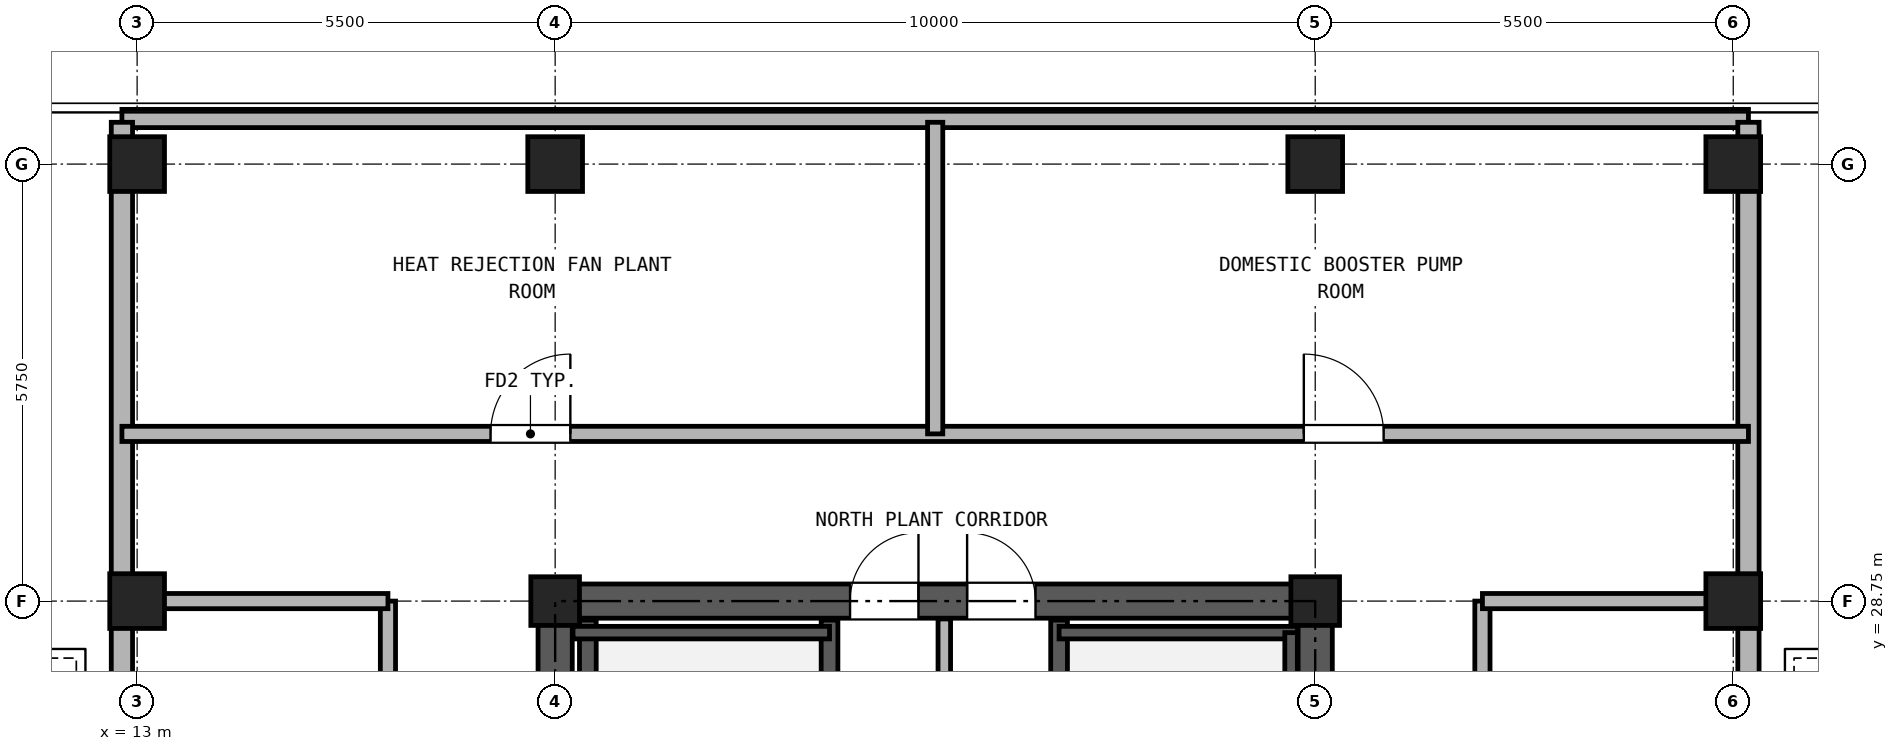
"""IFC4 building model, lengths in metres.
Left out: names, types, materials, properties, quantities, classifications, styles, units other than length and angle.
Written with IfcOpenShell. Run it as: python <this file> out.ifc"""

import sys

from ifc_helpers import new_model, si_unit, direction, frame, frame_2d, origin, origin_2d, place, context, subcontext, project, spatial, rectangle, hollow_rectangle, extrude, source, transform, mapped, element, fill, save


model = new_model("IFC4")
c1 = context("Model", 3, precision=1e-05, world=origin(), true_north=direction((0.0, 1.0)))
c2 = subcontext(c1, "Body", "Model", "MODEL_VIEW")
j1 = project(units=[si_unit("LENGTHUNIT", "METRE"), si_unit("PLANEANGLEUNIT", "RADIAN")], contexts=[c1])
p1 = place(None, origin())
s1 = spatial("IfcSite", under=j1, at=p1, CompositionType="ELEMENT")
p2 = place(p1, origin())
s2 = spatial("IfcBuilding", under=s1, at=p2, CompositionType="ELEMENT")
p3 = place(p2, frame((0.0, 0.0, 188.1)))
s3 = spatial("IfcBuildingStorey", under=s2, at=p3, CompositionType="ELEMENT", Elevation=188.1)
m1 = source(origin(), c2, "Body", "SweptSolid", [
    extrude(hollow_rectangle(XDim=0.72, YDim=0.72, WallThickness=0.04, at=origin_2d()), origin(), (0.0, 0.0, 1.0), 4.85),
])
for number, where, z_axis, x_axis in (
    (1, (13.0, 34.5, 0.0), (0.0, 0.0, 1.0), (1.0, 0.0, 0.0)),
    (2, (18.5, 34.5, 0.0), (0.0, 0.0, 1.0), (1.0, 0.0, 0.0)),
    (3, (28.5, 34.5, 0.0), (0.0, 0.0, 1.0), (1.0, 0.0, 0.0)),
    (4, (34.0, 34.5, 0.0), (0.0, 0.0, 1.0), (1.0, 0.0, 0.0)),
    (5, (13.0, 28.75, 0.0), (0.0, 0.0, 1.0), (1.0, 0.0, 0.0)),
):
    element("IfcColumn", number, at=place(p3, frame(where, z_axis=z_axis, x_axis=x_axis)), inside=s3, PredefinedType="COLUMN", context=c2, shape_type="MappedRepresentation", body=[
        mapped(m1, transform((0.0, 0.0, 0.0), x_axis=(1.0, 0.0, 0.0), y_axis=(0.0, 1.0, 0.0), z_axis=(0.0, 0.0, 1.0), scale=1.0)),
    ])
m2 = source(origin(), c2, "Body", "SweptSolid", [
    extrude(hollow_rectangle(XDim=0.64, YDim=0.64, WallThickness=0.035, at=origin_2d()), origin(), (0.0, 0.0, 1.0), 4.85),
])
for number, where, z_axis, x_axis in (
    (6, (18.5, 28.75, 0.0), (0.0, 0.0, 1.0), (1.0, 0.0, 0.0)),
    (7, (28.5, 28.75, 0.0), (0.0, 0.0, 1.0), (1.0, 0.0, 0.0)),
):
    element("IfcColumn", number, at=place(p3, frame(where, z_axis=z_axis, x_axis=x_axis)), inside=s3, PredefinedType="COLUMN", context=c2, shape_type="MappedRepresentation", body=[
        mapped(m2, transform((0.0, 0.0, 0.0), x_axis=(1.0, 0.0, 0.0), y_axis=(0.0, 1.0, 0.0), z_axis=(0.0, 0.0, 1.0), scale=1.0)),
    ])
p4 = place(p3, frame((34.0, 28.75, 0.0), z_axis=(0.0, 0.0, 1.0), x_axis=(1.0, 0.0, 0.0)))
e8 = element("IfcColumn", 8, at=p4, inside=s3, PredefinedType="COLUMN", context=c2, shape_type="MappedRepresentation", body=[
    mapped(m1, transform((0.0, 0.0, 0.0), x_axis=(1.0, 0.0, 0.0), y_axis=(0.0, 1.0, 0.0), z_axis=(0.0, 0.0, 1.0), scale=1.0)),
])
p5 = place(p3, frame((34.2, 35.1, 0.0), z_axis=(0.0, 0.0, 1.0), x_axis=(-1.0, 0.0, 0.0)))
e9 = element("IfcWall", 9, at=p5, inside=s3, PredefinedType="SOLIDWALL", context=c2, shape_type="SweptSolid", body=[
    extrude(rectangle(XDim=21.4, YDim=0.24, at=frame_2d((10.7, 0.0))), origin(), (0.0, 0.0, 1.0), 4.85),
])
p6 = place(p3, frame((18.275, 28.75, 0.0), z_axis=(0.0, 0.0, 1.0), x_axis=(1.0, 0.0, 0.0)))
e10 = element("IfcWall", 10, at=p6, inside=s3, PredefinedType="SHEAR", context=c2, shape_type="SweptSolid", body=[
    extrude(rectangle(XDim=10.45, YDim=0.45, at=frame_2d((5.225, 0.0))), origin(), (0.0, 0.0, 1.0), 4.85),
])
p7 = place(p6, frame((4.105, 0.0, 0.0)))
e11 = element("IfcOpeningElement", 11, at=p7, cuts=e10, PredefinedType="OPENING", context=c2, shape_type="SweptSolid", body=[
    extrude(rectangle(XDim=0.9, YDim=2.05, at=frame_2d((0.45, 1.025))), frame((0.0, 0.235, 0.0), z_axis=(0.0, -1.0, 0.0), x_axis=(1.0, 0.0, 0.0)), (0.0, 0.0, 1.0), 0.47),
])
p8 = place(p6, frame((5.645, 0.0, 0.0)))
e12 = element("IfcOpeningElement", 12, at=p8, cuts=e10, PredefinedType="OPENING", context=c2, shape_type="SweptSolid", body=[
    extrude(rectangle(XDim=0.9, YDim=2.05, at=frame_2d((0.45, 1.025))), frame((0.0, 0.235, 0.0), z_axis=(0.0, -1.0, 0.0), x_axis=(1.0, 0.0, 0.0)), (0.0, 0.0, 1.0), 0.47),
])
p9 = place(p3, frame((18.5, 11.725, 0.0), z_axis=(0.0, 0.0, 1.0), x_axis=(0.0, 1.0, 0.0)))
e13 = element("IfcWall", 13, at=p9, inside=s3, PredefinedType="SHEAR", context=c2, shape_type="SweptSolid", body=[
    extrude(rectangle(XDim=16.8, YDim=0.45, at=frame_2d((8.4, 0.0))), origin(), (0.0, 0.0, 1.0), 4.85),
])
p10 = place(p9, frame((7.425, 0.0, 0.0)))
e14 = element("IfcOpeningElement", 14, at=p10, cuts=e13, PredefinedType="OPENING", context=c2, shape_type="SweptSolid", body=[
    extrude(rectangle(XDim=1.15, YDim=2.2, at=frame_2d((0.575, 1.1))), frame((0.0, 0.235, 0.0), z_axis=(0.0, -1.0, 0.0), x_axis=(1.0, 0.0, 0.0)), (0.0, 0.0, 1.0), 0.47),
])
p11 = place(p3, frame((28.5, 11.725, 0.0), z_axis=(0.0, 0.0, 1.0), x_axis=(0.0, 1.0, 0.0)))
e15 = element("IfcWall", 15, at=p11, inside=s3, PredefinedType="SHEAR", context=c2, shape_type="SweptSolid", body=[
    extrude(rectangle(XDim=16.8, YDim=0.45, at=frame_2d((8.4, 0.0))), origin(), (0.0, 0.0, 1.0), 4.85),
])
p12 = place(p11, frame((7.425, 0.0, 0.0)))
e16 = element("IfcOpeningElement", 16, at=p12, cuts=e15, PredefinedType="OPENING", context=c2, shape_type="SweptSolid", body=[
    extrude(rectangle(XDim=1.15, YDim=2.2, at=frame_2d((0.575, 1.1))), frame((0.0, 0.235, 0.0), z_axis=(0.0, -1.0, 0.0), x_axis=(1.0, 0.0, 0.0)), (0.0, 0.0, 1.0), 0.47),
])
for number, where, z_axis, x_axis in (
    (17, (18.93, 21.39, 0.0), (0.0, 0.0, 1.0), (0.0, 1.0, 0.0)),
    (18, (22.11, 21.39, 0.0), (0.0, 0.0, 1.0), (0.0, 1.0, 0.0)),
    (19, (25.13, 21.39, 0.0), (0.0, 0.0, 1.0), (0.0, 1.0, 0.0)),
):
    element("IfcWall", number, at=place(p3, frame(where, z_axis=z_axis, x_axis=x_axis)), inside=s3, PredefinedType="SOLIDWALL", context=c2, shape_type="SweptSolid", body=[
        extrude(rectangle(XDim=7.11, YDim=0.22, at=frame_2d((3.555, 0.0))), origin(), (0.0, 0.0, 1.0), 4.85),
    ])
p13 = place(p3, frame((18.735, 28.335, 0.0), z_axis=(0.0, 0.0, 1.0), x_axis=(1.0, 0.0, 0.0)))
e20 = element("IfcWall", 20, at=p13, inside=s3, PredefinedType="PARTITIONING", context=c2, shape_type="SweptSolid", body=[
    extrude(rectangle(XDim=3.375, YDim=0.165, at=frame_2d((1.688, 0.0))), origin(), (0.0, 0.0, 1.0), 4.85),
])
p14 = place(p3, frame((25.13, 28.335, 0.0), z_axis=(0.0, 0.0, 1.0), x_axis=(1.0, 0.0, 0.0)))
e21 = element("IfcWall", 21, at=p14, inside=s3, PredefinedType="PARTITIONING", context=c2, shape_type="SweptSolid", body=[
    extrude(rectangle(XDim=3.135, YDim=0.165, at=frame_2d((1.567, 0.0))), origin(), (0.0, 0.0, 1.0), 4.85),
])
p15 = place(p3, frame((28.183, 21.39, 0.0), z_axis=(0.0, 0.0, 1.0), x_axis=(0.0, 1.0, 0.0)))
e22 = element("IfcWall", 22, at=p15, inside=s3, PredefinedType="PARTITIONING", context=c2, shape_type="SweptSolid", body=[
    extrude(rectangle(XDim=6.945, YDim=0.165, at=frame_2d((3.473, 0.0))), origin(), (0.0, 0.0, 1.0), 4.85),
])
p16 = place(p3, frame((23.62, 24.4, 0.0), z_axis=(0.0, 0.0, 1.0), x_axis=(0.0, 1.0, 0.0)))
e23 = element("IfcWall", 23, at=p16, inside=s3, PredefinedType="PARTITIONING", context=c2, shape_type="SweptSolid", body=[
    extrude(rectangle(XDim=4.115, YDim=0.165, at=frame_2d((2.058, 0.0))), origin(), (0.0, 0.0, 1.0), 4.85),
])
for number, where, z_axis, x_axis in (
    (24, (12.8, 0.25, 0.0), (0.0, 0.0, 1.0), (0.0, 1.0, 0.0)),
    (25, (34.2, 0.25, 0.0), (0.0, 0.0, 1.0), (0.0, 1.0, 0.0)),
):
    element("IfcWall", number, at=place(p3, frame(where, z_axis=z_axis, x_axis=x_axis)), inside=s3, PredefinedType="SOLIDWALL", context=c2, shape_type="SweptSolid", body=[
        extrude(rectangle(XDim=34.8, YDim=0.28, at=frame_2d((17.4, 0.0))), origin(), (0.0, 0.0, 1.0), 4.223),
    ])
p17 = place(p3, frame((12.8, 30.95, 0.0), z_axis=(0.0, 0.0, 1.0), x_axis=(1.0, 0.0, 0.0)))
e26 = element("IfcWall", 26, at=p17, inside=s3, PredefinedType="PARTITIONING", context=c2, shape_type="SweptSolid", body=[
    extrude(rectangle(XDim=21.4, YDim=0.2, at=frame_2d((10.7, 0.0))), origin(), (0.0, 0.0, 1.0), 4.85),
])
p18 = place(p17, frame((4.85, 0.0, 0.0)))
e27 = element("IfcOpeningElement", 27, at=p18, cuts=e26, PredefinedType="OPENING", context=c2, shape_type="SweptSolid", body=[
    extrude(rectangle(XDim=1.05, YDim=2.15, at=frame_2d((0.525, 1.075))), frame((0.0, 0.11, 0.0), z_axis=(0.0, -1.0, 0.0), x_axis=(1.0, 0.0, 0.0)), (0.0, 0.0, 1.0), 0.22),
])
p19 = place(p17, frame((15.55, 0.0, 0.0)))
e28 = element("IfcOpeningElement", 28, at=p19, cuts=e26, PredefinedType="OPENING", context=c2, shape_type="SweptSolid", body=[
    extrude(rectangle(XDim=1.05, YDim=2.15, at=frame_2d((0.525, 1.075))), frame((0.0, 0.11, 0.0), z_axis=(0.0, -1.0, 0.0), x_axis=(1.0, 0.0, 0.0)), (0.0, 0.0, 1.0), 0.22),
])
p20 = place(p3, frame((16.3, 8.9, 0.0), z_axis=(0.0, 0.0, 1.0), x_axis=(0.0, 1.0, 0.0)))
e29 = element("IfcWall", 29, at=p20, inside=s3, PredefinedType="PARTITIONING", context=c2, shape_type="SweptSolid", body=[
    extrude(rectangle(XDim=19.85, YDim=0.2, at=frame_2d((9.925, 0.0))), origin(), (0.0, 0.0, 1.0), 4.85),
])
p21 = place(p20, frame((10.6, 0.0, 0.0)))
e30 = element("IfcOpeningElement", 30, at=p21, cuts=e29, PredefinedType="OPENING", context=c2, shape_type="SweptSolid", body=[
    extrude(rectangle(XDim=1.05, YDim=2.15, at=frame_2d((0.525, 1.075))), frame((0.0, 0.11, 0.0), z_axis=(0.0, -1.0, 0.0), x_axis=(1.0, 0.0, 0.0)), (0.0, 0.0, 1.0), 0.22),
])
p22 = place(p3, frame((30.7, 8.9, 0.0), z_axis=(0.0, 0.0, 1.0), x_axis=(0.0, 1.0, 0.0)))
e31 = element("IfcWall", 31, at=p22, inside=s3, PredefinedType="PARTITIONING", context=c2, shape_type="SweptSolid", body=[
    extrude(rectangle(XDim=19.85, YDim=0.2, at=frame_2d((9.925, 0.0))), origin(), (0.0, 0.0, 1.0), 4.85),
])
p23 = place(p22, frame((10.6, 0.0, 0.0)))
e32 = element("IfcOpeningElement", 32, at=p23, cuts=e31, PredefinedType="OPENING", context=c2, shape_type="SweptSolid", body=[
    extrude(rectangle(XDim=1.05, YDim=2.15, at=frame_2d((0.525, 1.075))), frame((0.0, 0.11, 0.0), z_axis=(0.0, -1.0, 0.0), x_axis=(1.0, 0.0, 0.0)), (0.0, 0.0, 1.0), 0.22),
])
for number, where, z_axis, x_axis in (
    (33, (12.8, 28.75, 0.0), (0.0, 0.0, 1.0), (1.0, 0.0, 0.0)),
    (34, (30.7, 28.75, 0.0), (0.0, 0.0, 1.0), (1.0, 0.0, 0.0)),
):
    element("IfcWall", number, at=place(p3, frame(where, z_axis=z_axis, x_axis=x_axis)), inside=s3, PredefinedType="PARTITIONING", context=c2, shape_type="SweptSolid", body=[
        extrude(rectangle(XDim=3.5, YDim=0.2, at=frame_2d((1.75, 0.0))), origin(), (0.0, 0.0, 1.0), 4.223),
    ])
p24 = place(p3, frame((23.5, 30.95, 0.0), z_axis=(0.0, 0.0, 1.0), x_axis=(0.0, 1.0, 0.0)))
e35 = element("IfcWall", 35, at=p24, inside=s3, PredefinedType="PARTITIONING", context=c2, shape_type="SweptSolid", body=[
    extrude(rectangle(XDim=4.1, YDim=0.2, at=frame_2d((2.05, 0.0))), origin(), (0.0, 0.0, 1.0), 4.85),
])
p25 = place(p7, origin())
e36 = element("IfcDoor", 36, at=p25, inside=s3, OperationType="SINGLE_SWING_RIGHT", PredefinedType="DOOR", context=c2, shape_type="SweptSolid", body=[
    extrude(rectangle(XDim=0.9, YDim=2.05, at=frame_2d((0.45, 1.025))), frame((0.0, 0.025, 0.0), z_axis=(0.0, -1.0, 0.0), x_axis=(1.0, 0.0, 0.0)), (0.0, 0.0, 1.0), 0.05),
])
fill(e11, e36)
p26 = place(p8, origin())
e37 = element("IfcDoor", 37, at=p26, inside=s3, OperationType="SINGLE_SWING_LEFT", PredefinedType="DOOR", context=c2, shape_type="SweptSolid", body=[
    extrude(rectangle(XDim=0.9, YDim=2.05, at=frame_2d((0.45, 1.025))), frame((0.0, 0.025, 0.0), z_axis=(0.0, -1.0, 0.0), x_axis=(1.0, 0.0, 0.0)), (0.0, 0.0, 1.0), 0.05),
])
fill(e12, e37)
p27 = place(p18, origin())
e38 = element("IfcDoor", 38, at=p27, inside=s3, OperationType="SINGLE_SWING_RIGHT", PredefinedType="DOOR", context=c2, shape_type="SweptSolid", body=[
    extrude(rectangle(XDim=1.05, YDim=2.15, at=frame_2d((0.525, 1.075))), frame((0.0, 0.025, 0.0), z_axis=(0.0, -1.0, 0.0), x_axis=(1.0, 0.0, 0.0)), (0.0, 0.0, 1.0), 0.05),
])
fill(e27, e38)
p28 = place(p19, origin())
e39 = element("IfcDoor", 39, at=p28, inside=s3, OperationType="SINGLE_SWING_LEFT", PredefinedType="DOOR", context=c2, shape_type="SweptSolid", body=[
    extrude(rectangle(XDim=1.05, YDim=2.15, at=frame_2d((0.525, 1.075))), frame((0.0, 0.025, 0.0), z_axis=(0.0, -1.0, 0.0), x_axis=(1.0, 0.0, 0.0)), (0.0, 0.0, 1.0), 0.05),
])
fill(e28, e39)
save(model, sys.argv[1])
